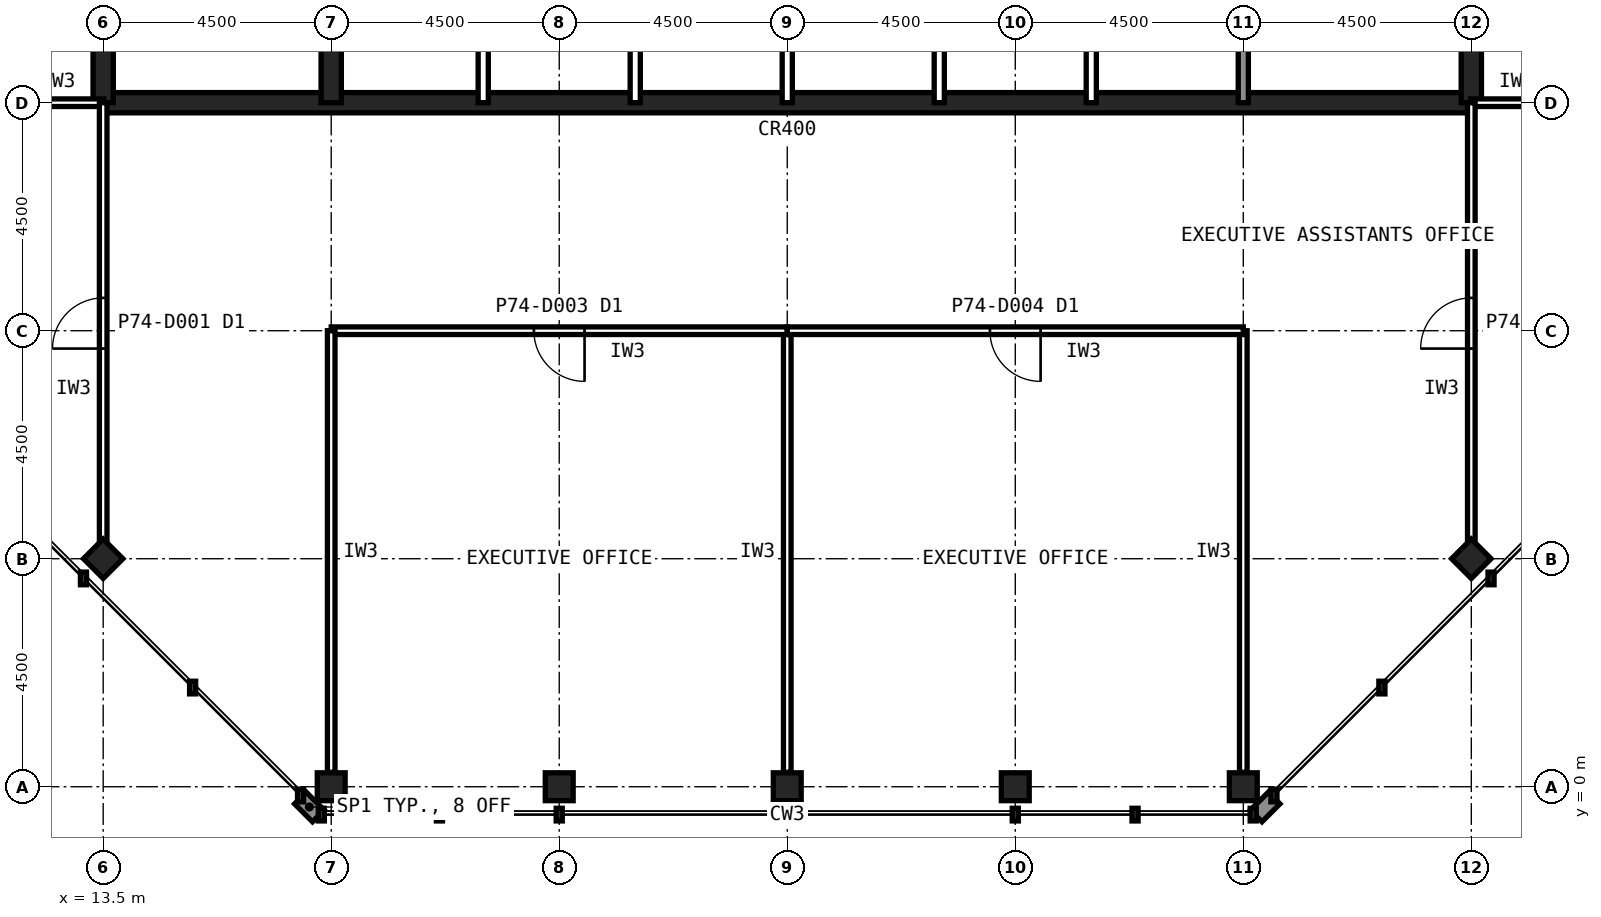
"""IFC4 building model, lengths in metres.
Left out: names, types, materials, properties, quantities, classifications, styles, units other than length and angle.
Written with IfcOpenShell. Run it as: python <this file> out.ifc"""

import sys

from ifc_helpers import new_model, si_unit, direction, frame, frame_2d, origin, origin_2d, place, context, subcontext, project, spatial, rectangle, hollow_rectangle, extrude, element, fill, save


model = new_model("IFC4")
c1 = context("Model", 3, precision=1e-05, world=origin(), true_north=direction((0.0, 1.0)))
c2 = subcontext(c1, "Body", "Model", "MODEL_VIEW")
j1 = project(units=[si_unit("LENGTHUNIT", "METRE"), si_unit("PLANEANGLEUNIT", "RADIAN")], contexts=[c1])
p1 = place(None, origin())
s1 = spatial("IfcSite", under=j1, at=p1, CompositionType="ELEMENT")
p2 = place(p1, origin())
s2 = spatial("IfcBuilding", under=s1, at=p2, CompositionType="ELEMENT")
p3 = place(p2, frame((0.0, 0.0, 310.6)))
s3 = spatial("IfcBuildingStorey", under=s2, at=p3, CompositionType="ELEMENT", Elevation=310.6)
for number, where, z_axis, x_axis in (
    (1, (18.0, 0.0, 0.0), (0.0, 0.0, 1.0), (1.0, 0.0, 0.0)),
    (2, (22.5, 0.0, 0.0), (0.0, 0.0, 1.0), (1.0, 0.0, 0.0)),
    (3, (27.0, 0.0, 0.0), (0.0, 0.0, 1.0), (1.0, 0.0, 0.0)),
    (4, (31.5, 0.0, 0.0), (0.0, 0.0, 1.0), (1.0, 0.0, 0.0)),
    (5, (36.0, 0.0, 0.0), (0.0, 0.0, 1.0), (1.0, 0.0, 0.0)),
    (6, (13.5, 4.5, 0.0), (0.0, 0.0, 1.0), (0.707, 0.707, 0.0)),
    (7, (40.5, 4.5, 0.0), (0.0, 0.0, 1.0), (0.707, 0.707, 0.0)),
):
    element("IfcColumn", number, at=place(p3, frame(where, z_axis=z_axis, x_axis=x_axis)), inside=s3, PredefinedType="COLUMN", context=c2, shape_type="SweptSolid", body=[
        extrude(hollow_rectangle(XDim=0.55, YDim=0.55, WallThickness=0.025, at=origin_2d()), origin(), (0.0, 0.0, 1.0), 4.5),
    ])
p4 = place(p3, frame((13.5, 13.5, 0.0), z_axis=(0.0, 0.0, 1.0), x_axis=(1.0, 0.0, 0.0)))
e8 = element("IfcWall", 8, at=p4, inside=s3, PredefinedType="SHEAR", context=c2, shape_type="SweptSolid", body=[
    extrude(rectangle(XDim=27.0, YDim=0.4, at=frame_2d((13.5, 0.0))), origin(), (0.0, 0.0, 1.0), 4.5),
])
p5 = place(p3, frame((40.5, 13.5, 0.0), z_axis=(0.0, 0.0, 1.0), x_axis=(0.0, 1.0, 0.0)))
e9 = element("IfcWall", 9, at=p5, inside=s3, PredefinedType="SHEAR", context=c2, shape_type="SweptSolid", body=[
    extrude(rectangle(XDim=27.0, YDim=0.4, at=frame_2d((13.5, 0.0))), origin(), (0.0, 0.0, 1.0), 4.5),
])
p6 = place(p5, frame((5.85, 0.0, 0.0)))
e10 = element("IfcOpeningElement", 10, at=p6, cuts=e9, PredefinedType="OPENING", context=c2, shape_type="SweptSolid", body=[
    extrude(rectangle(XDim=1.8, YDim=2.1, at=frame_2d((0.9, 1.05))), frame((0.0, 0.21, 0.0), z_axis=(0.0, -1.0, 0.0), x_axis=(1.0, 0.0, 0.0)), (0.0, 0.0, 1.0), 0.42),
])
p7 = place(p5, frame((19.65, 0.0, 0.0)))
e11 = element("IfcOpeningElement", 11, at=p7, cuts=e9, PredefinedType="OPENING", context=c2, shape_type="SweptSolid", body=[
    extrude(rectangle(XDim=1.2, YDim=2.1, at=frame_2d((0.6, 1.05))), frame((0.0, 0.21, 0.0), z_axis=(0.0, -1.0, 0.0), x_axis=(1.0, 0.0, 0.0)), (0.0, 0.0, 1.0), 0.42),
])
p8 = place(p3, frame((13.5, 40.5, 0.0), z_axis=(0.0, 0.0, 1.0), x_axis=(0.0, -1.0, 0.0)))
e12 = element("IfcWall", 12, at=p8, inside=s3, PredefinedType="SHEAR", context=c2, shape_type="SweptSolid", body=[
    extrude(rectangle(XDim=27.0, YDim=0.4, at=frame_2d((13.5, 0.0))), origin(), (0.0, 0.0, 1.0), 4.5),
])
p9 = place(p8, frame((19.65, 0.0, 0.0)))
e13 = element("IfcOpeningElement", 13, at=p9, cuts=e12, PredefinedType="OPENING", context=c2, shape_type="SweptSolid", body=[
    extrude(rectangle(XDim=1.2, YDim=2.1, at=frame_2d((0.6, 1.05))), frame((0.0, 0.21, 0.0), z_axis=(0.0, -1.0, 0.0), x_axis=(1.0, 0.0, 0.0)), (0.0, 0.0, 1.0), 0.42),
])
p10 = place(p8, frame((5.85, 0.0, 0.0)))
e14 = element("IfcOpeningElement", 14, at=p10, cuts=e12, PredefinedType="OPENING", context=c2, shape_type="SweptSolid", body=[
    extrude(rectangle(XDim=1.8, YDim=2.1, at=frame_2d((0.9, 1.05))), frame((0.0, 0.21, 0.0), z_axis=(0.0, -1.0, 0.0), x_axis=(1.0, 0.0, 0.0)), (0.0, 0.0, 1.0), 0.42),
])
p11 = place(p3, frame((18.0, 13.5, 0.0), z_axis=(0.0, 0.0, 1.0), x_axis=(0.0, 1.0, 0.0)))
e15 = element("IfcWall", 15, at=p11, inside=s3, PredefinedType="SHEAR", context=c2, shape_type="SweptSolid", body=[
    extrude(rectangle(XDim=18.0, YDim=0.4, at=frame_2d((9.0, 0.0))), origin(), (0.0, 0.0, 1.0), 4.5),
])
p12 = place(p3, frame((36.0, 13.5, 0.0), z_axis=(0.0, 0.0, 1.0), x_axis=(0.0, 1.0, 0.0)))
e16 = element("IfcWall", 16, at=p12, inside=s3, PredefinedType="SOLIDWALL", context=c2, shape_type="SweptSolid", body=[
    extrude(rectangle(XDim=4.5, YDim=0.2, at=frame_2d((2.25, 0.0))), origin(), (0.0, 0.0, 1.0), 4.32),
])
for number, where, z_axis, x_axis in (
    (17, (21.0, 13.5, 0.0), (0.0, 0.0, 1.0), (0.0, 1.0, 0.0)),
    (18, (24.0, 13.5, 0.0), (0.0, 0.0, 1.0), (0.0, 1.0, 0.0)),
    (19, (27.0, 13.5, 0.0), (0.0, 0.0, 1.0), (0.0, 1.0, 0.0)),
    (20, (30.0, 13.5, 0.0), (0.0, 0.0, 1.0), (0.0, 1.0, 0.0)),
    (21, (33.0, 13.5, 0.0), (0.0, 0.0, 1.0), (0.0, 1.0, 0.0)),
):
    element("IfcWall", number, at=place(p3, frame(where, z_axis=z_axis, x_axis=x_axis)), inside=s3, PredefinedType="PARTITIONING", context=c2, shape_type="SweptSolid", body=[
        extrude(rectangle(XDim=4.5, YDim=0.2, at=frame_2d((2.25, 0.0))), origin(), (0.0, 0.0, 1.0), 4.32),
    ])
for number, where, z_axis, x_axis in (
    (22, (11.7, 13.5, 0.0), (0.0, 0.0, 1.0), (1.0, 0.0, 0.0)),
    (23, (40.49, 13.5, 0.0), (0.0, 0.0, 1.0), (1.0, 0.0, 0.0)),
):
    element("IfcWall", number, at=place(p3, frame(where, z_axis=z_axis, x_axis=x_axis)), inside=s3, PredefinedType="PARTITIONING", context=c2, shape_type="SweptSolid", body=[
        extrude(rectangle(XDim=1.81, YDim=0.15, at=frame_2d((0.905, 0.0))), origin(), (0.0, 0.0, 1.0), 3.393),
    ])
p13 = place(p3, frame((27.0, 0.285, 0.0), z_axis=(0.0, 0.0, 1.0), x_axis=(0.0, 1.0, 0.0)))
e24 = element("IfcWall", 24, at=p13, inside=s3, PredefinedType="PARTITIONING", context=c2, shape_type="SweptSolid", body=[
    extrude(rectangle(XDim=8.715, YDim=0.15, at=frame_2d((4.357, 0.0))), origin(), (0.0, 0.0, 1.0), 3.393),
])
p14 = place(p3, frame((27.0, 9.0, 0.0), z_axis=(0.0, 0.0, 1.0), x_axis=(-1.0, 0.0, 0.0)))
e25 = element("IfcWall", 25, at=p14, inside=s3, PredefinedType="PARTITIONING", context=c2, shape_type="SweptSolid", body=[
    extrude(rectangle(XDim=9.0, YDim=0.15, at=frame_2d((4.5, 0.0))), origin(), (0.0, 0.0, 1.0), 4.32),
])
p15 = place(p14, frame((4.0, 0.0, 0.0)))
e26 = element("IfcOpeningElement", 26, at=p15, cuts=e25, PredefinedType="OPENING", context=c2, shape_type="SweptSolid", body=[
    extrude(rectangle(XDim=1.0, YDim=2.1, at=frame_2d((0.5, 1.05))), frame((0.0, 0.085, 0.0), z_axis=(0.0, -1.0, 0.0), x_axis=(1.0, 0.0, 0.0)), (0.0, 0.0, 1.0), 0.17),
])
for number, where, z_axis, x_axis in (
    (27, (18.0, 9.0, 0.0), (0.0, 0.0, 1.0), (0.0, -1.0, 0.0)),
    (28, (36.0, 0.285, 0.0), (0.0, 0.0, 1.0), (0.0, 1.0, 0.0)),
):
    element("IfcWall", number, at=place(p3, frame(where, z_axis=z_axis, x_axis=x_axis)), inside=s3, PredefinedType="PARTITIONING", context=c2, shape_type="SweptSolid", body=[
        extrude(rectangle(XDim=8.715, YDim=0.15, at=frame_2d((4.357, 0.0))), origin(), (0.0, 0.0, 1.0), 3.393),
    ])
p16 = place(p3, frame((36.0, 9.0, 0.0), z_axis=(0.0, 0.0, 1.0), x_axis=(-1.0, 0.0, 0.0)))
e29 = element("IfcWall", 29, at=p16, inside=s3, PredefinedType="PARTITIONING", context=c2, shape_type="SweptSolid", body=[
    extrude(rectangle(XDim=9.0, YDim=0.15, at=frame_2d((4.5, 0.0))), origin(), (0.0, 0.0, 1.0), 4.32),
])
p17 = place(p16, frame((4.0, 0.0, 0.0)))
e30 = element("IfcOpeningElement", 30, at=p17, cuts=e29, PredefinedType="OPENING", context=c2, shape_type="SweptSolid", body=[
    extrude(rectangle(XDim=1.0, YDim=2.1, at=frame_2d((0.5, 1.05))), frame((0.0, 0.085, 0.0), z_axis=(0.0, -1.0, 0.0), x_axis=(1.0, 0.0, 0.0)), (0.0, 0.0, 1.0), 0.17),
])
p18 = place(p3, frame((40.5, 4.795, 0.0), z_axis=(0.0, 0.0, 1.0), x_axis=(0.0, 1.0, 0.0)))
e31 = element("IfcWall", 31, at=p18, inside=s3, PredefinedType="PARTITIONING", context=c2, shape_type="SweptSolid", body=[
    extrude(rectangle(XDim=8.705, YDim=0.15, at=frame_2d((4.353, 0.0))), origin(), (0.0, 0.0, 1.0), 3.393),
])
p19 = place(p18, frame((3.853, 0.0, 0.0)))
e32 = element("IfcOpeningElement", 32, at=p19, cuts=e31, PredefinedType="OPENING", context=c2, shape_type="SweptSolid", body=[
    extrude(rectangle(XDim=1.0, YDim=2.1, at=frame_2d((0.5, 1.05))), frame((0.0, 0.085, 0.0), z_axis=(0.0, -1.0, 0.0), x_axis=(1.0, 0.0, 0.0)), (0.0, 0.0, 1.0), 0.17),
])
p20 = place(p3, frame((13.5, 4.795, 0.0), z_axis=(0.0, 0.0, 1.0), x_axis=(0.0, 1.0, 0.0)))
e33 = element("IfcWall", 33, at=p20, inside=s3, PredefinedType="PARTITIONING", context=c2, shape_type="SweptSolid", body=[
    extrude(rectangle(XDim=8.705, YDim=0.15, at=frame_2d((4.353, 0.0))), origin(), (0.0, 0.0, 1.0), 3.393),
])
p21 = place(p20, frame((3.853, 0.0, 0.0)))
e34 = element("IfcOpeningElement", 34, at=p21, cuts=e33, PredefinedType="OPENING", context=c2, shape_type="SweptSolid", body=[
    extrude(rectangle(XDim=1.0, YDim=2.1, at=frame_2d((0.5, 1.05))), frame((0.0, 0.085, 0.0), z_axis=(0.0, -1.0, 0.0), x_axis=(1.0, 0.0, 0.0)), (0.0, 0.0, 1.0), 0.17),
])
p22 = place(p15, origin())
e35 = element("IfcDoor", 35, at=p22, inside=s3, OperationType="SINGLE_SWING_LEFT", PredefinedType="DOOR", context=c2, shape_type="SweptSolid", body=[
    extrude(rectangle(XDim=1.0, YDim=2.1, at=frame_2d((0.5, 1.05))), frame((0.0, 0.025, 0.0), z_axis=(0.0, -1.0, 0.0), x_axis=(1.0, 0.0, 0.0)), (0.0, 0.0, 1.0), 0.05),
])
fill(e26, e35)
p23 = place(p17, origin())
e36 = element("IfcDoor", 36, at=p23, inside=s3, OperationType="SINGLE_SWING_LEFT", PredefinedType="DOOR", context=c2, shape_type="SweptSolid", body=[
    extrude(rectangle(XDim=1.0, YDim=2.1, at=frame_2d((0.5, 1.05))), frame((0.0, 0.025, 0.0), z_axis=(0.0, -1.0, 0.0), x_axis=(1.0, 0.0, 0.0)), (0.0, 0.0, 1.0), 0.05),
])
fill(e30, e36)
p24 = place(p19, origin())
e37 = element("IfcDoor", 37, at=p24, inside=s3, OperationType="SINGLE_SWING_LEFT", PredefinedType="DOOR", context=c2, shape_type="SweptSolid", body=[
    extrude(rectangle(XDim=1.0, YDim=2.1, at=frame_2d((0.5, 1.05))), frame((0.0, 0.025, 0.0), z_axis=(0.0, -1.0, 0.0), x_axis=(1.0, 0.0, 0.0)), (0.0, 0.0, 1.0), 0.05),
])
fill(e32, e37)
p25 = place(p21, origin())
e38 = element("IfcDoor", 38, at=p25, inside=s3, OperationType="SINGLE_SWING_LEFT", PredefinedType="DOOR", context=c2, shape_type="SweptSolid", body=[
    extrude(rectangle(XDim=1.0, YDim=2.1, at=frame_2d((0.5, 1.05))), frame((0.0, 0.025, 0.0), z_axis=(0.0, -1.0, 0.0), x_axis=(1.0, 0.0, 0.0)), (0.0, 0.0, 1.0), 0.05),
])
fill(e34, e38)
save(model, sys.argv[1])
